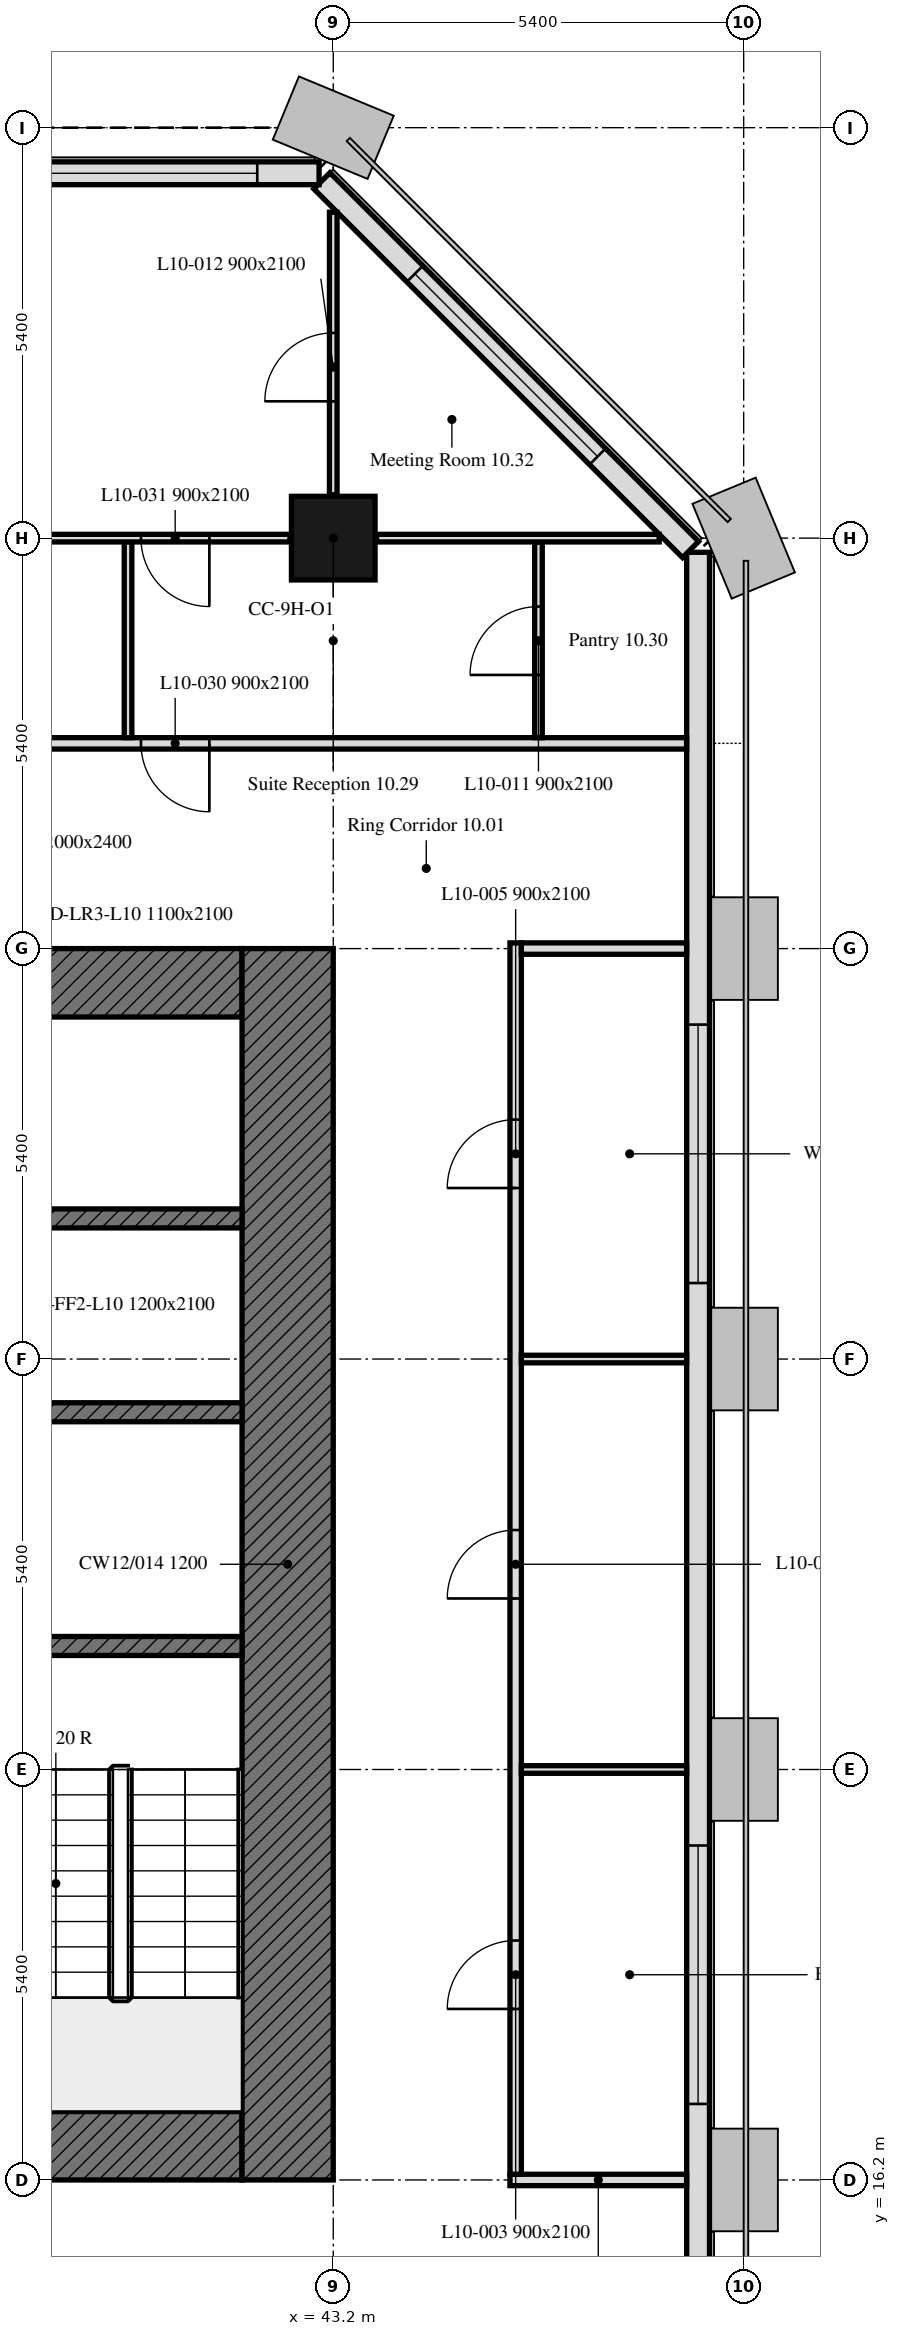
"""IFC4 building model, lengths in metres.
Left out: names, types, materials, properties, quantities, classifications, styles, units other than length and angle.
Written with IfcOpenShell. Run it as: python <this file> out.ifc"""

import sys

from ifc_helpers import new_model, si_unit, direction, frame, frame_2d, origin, origin_2d, place, context, subcontext, project, spatial, rectangle, extrude, element, fill, save


model = new_model("IFC4")
c1 = context("Model", 3, precision=1e-05, world=origin(), true_north=direction((0.0, 1.0)))
c2 = subcontext(c1, "Body", "Model", "MODEL_VIEW")
j1 = project(units=[si_unit("LENGTHUNIT", "METRE"), si_unit("PLANEANGLEUNIT", "RADIAN")], contexts=[c1])
p1 = place(None, origin())
s1 = spatial("IfcSite", under=j1, at=p1, CompositionType="ELEMENT")
p2 = place(p1, origin())
s2 = spatial("IfcBuilding", under=s1, at=p2, CompositionType="ELEMENT")
p3 = place(p2, frame((0.0, 0.0, 48.8)))
s3 = spatial("IfcBuildingStorey", under=s2, at=p3, CompositionType="ELEMENT", Elevation=48.8)
p4 = place(p3, frame((43.2, 37.8, 0.0), z_axis=(0.0, 0.0, 1.0), x_axis=(1.0, 0.0, 0.0)))
e1 = element("IfcColumn", 1, at=p4, inside=s3, PredefinedType="COLUMN", context=c2, shape_type="SweptSolid", body=[
    extrude(rectangle(XDim=1.1, YDim=1.1, at=origin_2d()), origin(), (0.0, 0.0, 1.0), 3.5),
])
p5 = place(p3, frame((48.0, 5.586, 0.0), z_axis=(0.0, 0.0, 1.0), x_axis=(0.0, 1.0, 0.0)))
e2 = element("IfcWall", 2, at=p5, inside=s3, PredefinedType="SOLIDWALL", context=c2, shape_type="SweptSolid", body=[
    extrude(rectangle(XDim=32.027, YDim=0.3, at=frame_2d((16.014, 0.0))), origin(), (0.0, 0.0, 1.0), 3.5),
])
p6 = place(p5, frame((0.814, 0.0, 0.9)))
e3 = element("IfcOpeningElement", 3, at=p6, cuts=e2, PredefinedType="OPENING", context=c2, shape_type="SweptSolid", body=[
    extrude(rectangle(XDim=3.4, YDim=1.7, at=frame_2d((1.7, 0.85))), frame((0.0, 0.16, 0.0), z_axis=(0.0, -1.0, 0.0), x_axis=(1.0, 0.0, 0.0)), (0.0, 0.0, 1.0), 0.32),
])
p7 = place(p5, frame((11.614, 0.0, 0.9)))
e4 = element("IfcOpeningElement", 4, at=p7, cuts=e2, PredefinedType="OPENING", context=c2, shape_type="SweptSolid", body=[
    extrude(rectangle(XDim=3.4, YDim=1.7, at=frame_2d((1.7, 0.85))), frame((0.0, 0.16, 0.0), z_axis=(0.0, -1.0, 0.0), x_axis=(1.0, 0.0, 0.0)), (0.0, 0.0, 1.0), 0.32),
])
p8 = place(p5, frame((22.414, 0.0, 0.9)))
e5 = element("IfcOpeningElement", 5, at=p8, cuts=e2, PredefinedType="OPENING", context=c2, shape_type="SweptSolid", body=[
    extrude(rectangle(XDim=3.4, YDim=1.7, at=frame_2d((1.7, 0.85))), frame((0.0, 0.16, 0.0), z_axis=(0.0, -1.0, 0.0), x_axis=(1.0, 0.0, 0.0)), (0.0, 0.0, 1.0), 0.32),
])
p9 = place(p3, frame((47.901, 37.65, 0.0), z_axis=(0.0, 0.0, 1.0), x_axis=(-0.707106781187, 0.707106781187, 0.0)))
e6 = element("IfcWall", 6, at=p9, inside=s3, PredefinedType="SOLIDWALL", context=c2, shape_type="SweptSolid", body=[
    extrude(rectangle(XDim=6.86, YDim=0.3, at=frame_2d((3.43, 0.0))), origin(), (0.0, 0.0, 1.0), 3.5),
])
p10 = place(p9, frame((1.73, 0.0, 0.9)))
e7 = element("IfcOpeningElement", 7, at=p10, cuts=e6, PredefinedType="OPENING", context=c2, shape_type="SweptSolid", body=[
    extrude(rectangle(XDim=3.4, YDim=1.7, at=frame_2d((1.7, 0.85))), frame((0.0, 0.16, 0.0), z_axis=(0.0, -1.0, 0.0), x_axis=(1.0, 0.0, 0.0)), (0.0, 0.0, 1.0), 0.32),
])
p11 = place(p3, frame((43.014, 42.6, 0.0), z_axis=(0.0, 0.0, 1.0), x_axis=(-1.0, 0.0, 0.0)))
e8 = element("IfcWall", 8, at=p11, inside=s3, PredefinedType="SOLIDWALL", context=c2, shape_type="SweptSolid", body=[
    extrude(rectangle(XDim=32.027, YDim=0.3, at=frame_2d((16.014, 0.0))), origin(), (0.0, 0.0, 1.0), 3.5),
])
p12 = place(p11, frame((0.814, 0.0, 0.9)))
e9 = element("IfcOpeningElement", 9, at=p12, cuts=e8, PredefinedType="OPENING", context=c2, shape_type="SweptSolid", body=[
    extrude(rectangle(XDim=3.4, YDim=1.7, at=frame_2d((1.7, 0.85))), frame((0.0, 0.16, 0.0), z_axis=(0.0, -1.0, 0.0), x_axis=(1.0, 0.0, 0.0)), (0.0, 0.0, 1.0), 0.32),
])
p13 = place(p11, frame((11.614, 0.0, 0.9)))
e10 = element("IfcOpeningElement", 10, at=p13, cuts=e8, PredefinedType="OPENING", context=c2, shape_type="SweptSolid", body=[
    extrude(rectangle(XDim=3.4, YDim=1.7, at=frame_2d((1.7, 0.85))), frame((0.0, 0.16, 0.0), z_axis=(0.0, -1.0, 0.0), x_axis=(1.0, 0.0, 0.0)), (0.0, 0.0, 1.0), 0.32),
])
p14 = place(p11, frame((22.414, 0.0, 0.9)))
e11 = element("IfcOpeningElement", 11, at=p14, cuts=e8, PredefinedType="OPENING", context=c2, shape_type="SweptSolid", body=[
    extrude(rectangle(XDim=3.4, YDim=1.7, at=frame_2d((1.7, 0.85))), frame((0.0, 0.16, 0.0), z_axis=(0.0, -1.0, 0.0), x_axis=(1.0, 0.0, 0.0)), (0.0, 0.0, 1.0), 0.32),
])
p15 = place(p3, frame((42.0, 16.65, 0.0), z_axis=(0.0, 0.0, 1.0), x_axis=(-1.0, 0.0, 0.0)))
e12 = element("IfcWall", 12, at=p15, inside=s3, PredefinedType="SOLIDWALL", context=c2, shape_type="SweptSolid", body=[
    extrude(rectangle(XDim=11.1, YDim=0.9, at=frame_2d((5.55, 0.0))), origin(), (0.0, 0.0, 1.0), 3.5),
])
p16 = place(p15, frame((3.55, 0.0, 0.0)))
e13 = element("IfcOpeningElement", 13, at=p16, cuts=e12, PredefinedType="OPENING", context=c2, shape_type="SweptSolid", body=[
    extrude(rectangle(XDim=2.0, YDim=2.4, at=frame_2d((1.0, 1.2))), frame((0.0, 0.45, 0.0), z_axis=(0.0, -1.0, 0.0), x_axis=(1.0, 0.0, 0.0)), (0.0, 0.0, 1.0), 0.9),
])
p17 = place(p3, frame((30.9, 31.95, 0.0), z_axis=(0.0, 0.0, 1.0), x_axis=(1.0, 0.0, 0.0)))
e14 = element("IfcWall", 14, at=p17, inside=s3, PredefinedType="SOLIDWALL", context=c2, shape_type="SweptSolid", body=[
    extrude(rectangle(XDim=11.1, YDim=0.9, at=frame_2d((5.55, 0.0))), origin(), (0.0, 0.0, 1.0), 3.5),
])
p18 = place(p17, frame((5.55, 0.0, 0.0)))
e15 = element("IfcOpeningElement", 15, at=p18, cuts=e14, PredefinedType="OPENING", context=c2, shape_type="SweptSolid", body=[
    extrude(rectangle(XDim=2.0, YDim=2.4, at=frame_2d((1.0, 1.2))), frame((0.0, 0.45, 0.0), z_axis=(0.0, -1.0, 0.0), x_axis=(1.0, 0.0, 0.0)), (0.0, 0.0, 1.0), 0.9),
])
p19 = place(p3, frame((42.6, 32.4, 0.0), z_axis=(0.0, 0.0, 1.0), x_axis=(0.0, -1.0, 0.0)))
e16 = element("IfcWall", 16, at=p19, inside=s3, PredefinedType="SOLIDWALL", context=c2, shape_type="SweptSolid", body=[
    extrude(rectangle(XDim=16.2, YDim=1.2, at=frame_2d((8.1, 0.0))), origin(), (0.0, 0.0, 1.0), 3.5),
])
for number, where, z_axis, x_axis in (
    (17, (38.8, 23.225, 0.0), (0.0, 0.0, 1.0), (1.0, 0.0, 0.0)),
    (18, (38.8, 26.3, 0.0), (0.0, 0.0, 1.0), (1.0, 0.0, 0.0)),
    (19, (38.8, 28.85, 0.0), (0.0, 0.0, 1.0), (1.0, 0.0, 0.0)),
):
    element("IfcWall", number, at=place(p3, frame(where, z_axis=z_axis, x_axis=x_axis)), inside=s3, PredefinedType="SOLIDWALL", context=c2, shape_type="SweptSolid", body=[
        extrude(rectangle(XDim=3.2, YDim=0.25, at=frame_2d((1.6, 0.0))), origin(), (0.0, 0.0, 1.0), 3.5),
    ])
p20 = place(p3, frame((47.849, 16.2, 0.0), z_axis=(0.0, 0.0, 1.0), x_axis=(-1.0, 0.0, 0.0)))
e20 = element("IfcWall", 20, at=p20, inside=s3, PredefinedType="PARTITIONING", context=c2, shape_type="SweptSolid", body=[
    extrude(rectangle(XDim=2.324, YDim=0.15, at=frame_2d((1.162, 0.0))), origin(), (0.0, 0.0, 1.0), 2.75),
])
p21 = place(p3, frame((45.6, 16.275, 0.0), z_axis=(0.0, 0.0, 1.0), x_axis=(0.0, 1.0, 0.0)))
e21 = element("IfcWall", 21, at=p21, inside=s3, PredefinedType="PARTITIONING", context=c2, shape_type="SweptSolid", body=[
    extrude(rectangle(XDim=16.2, YDim=0.15, at=frame_2d((8.1, 0.0))), origin(), (0.0, 0.0, 1.0), 2.75),
])
p22 = place(p21, frame((2.175, 0.0, 0.0)))
e22 = element("IfcOpeningElement", 22, at=p22, cuts=e21, PredefinedType="OPENING", context=c2, shape_type="SweptSolid", body=[
    extrude(rectangle(XDim=0.9, YDim=2.1, at=frame_2d((0.45, 1.05))), frame((0.0, 0.075, 0.0), z_axis=(0.0, -1.0, 0.0), x_axis=(1.0, 0.0, 0.0)), (0.0, 0.0, 1.0), 0.15),
])
p23 = place(p21, frame((7.575, 0.0, 0.0)))
e23 = element("IfcOpeningElement", 23, at=p23, cuts=e21, PredefinedType="OPENING", context=c2, shape_type="SweptSolid", body=[
    extrude(rectangle(XDim=0.9, YDim=2.1, at=frame_2d((0.45, 1.05))), frame((0.0, 0.075, 0.0), z_axis=(0.0, -1.0, 0.0), x_axis=(1.0, 0.0, 0.0)), (0.0, 0.0, 1.0), 0.15),
])
p24 = place(p21, frame((12.975, 0.0, 0.0)))
e24 = element("IfcOpeningElement", 24, at=p24, cuts=e21, PredefinedType="OPENING", context=c2, shape_type="SweptSolid", body=[
    extrude(rectangle(XDim=0.9, YDim=2.1, at=frame_2d((0.45, 1.05))), frame((0.0, 0.075, 0.0), z_axis=(0.0, -1.0, 0.0), x_axis=(1.0, 0.0, 0.0)), (0.0, 0.0, 1.0), 0.15),
])
p25 = place(p3, frame((45.675, 32.4, 0.0), z_axis=(0.0, 0.0, 1.0), x_axis=(1.0, 0.0, 0.0)))
e25 = element("IfcWall", 25, at=p25, inside=s3, PredefinedType="PARTITIONING", context=c2, shape_type="SweptSolid", body=[
    extrude(rectangle(XDim=2.174, YDim=0.15, at=frame_2d((1.087, 0.0))), origin(), (0.0, 0.0, 1.0), 2.75),
])
p26 = place(p3, frame((47.849, 35.1, 0.0), z_axis=(0.0, 0.0, 1.0), x_axis=(-1.0, 0.0, 0.0)))
e26 = element("IfcWall", 26, at=p26, inside=s3, PredefinedType="PARTITIONING", context=c2, shape_type="SweptSolid", body=[
    extrude(rectangle(XDim=41.698, YDim=0.15, at=frame_2d((20.849, 0.0))), origin(), (0.0, 0.0, 1.0), 3.5),
])
p27 = place(p26, frame((39.919, 0.0, 0.0)))
e27 = element("IfcOpeningElement", 27, at=p27, cuts=e26, PredefinedType="OPENING", context=c2, shape_type="SweptSolid", body=[
    extrude(rectangle(XDim=0.9, YDim=2.1, at=frame_2d((0.45, 1.05))), frame((0.0, 0.075, 0.0), z_axis=(0.0, -1.0, 0.0), x_axis=(1.0, 0.0, 0.0)), (0.0, 0.0, 1.0), 0.15),
])
p28 = place(p26, frame((12.919, 0.0, 0.0)))
e28 = element("IfcOpeningElement", 28, at=p28, cuts=e26, PredefinedType="OPENING", context=c2, shape_type="SweptSolid", body=[
    extrude(rectangle(XDim=0.9, YDim=2.1, at=frame_2d((0.45, 1.05))), frame((0.0, 0.075, 0.0), z_axis=(0.0, -1.0, 0.0), x_axis=(1.0, 0.0, 0.0)), (0.0, 0.0, 1.0), 0.15),
])
p29 = place(p26, frame((28.499, 0.0, 0.0)))
e29 = element("IfcOpeningElement", 29, at=p29, cuts=e26, PredefinedType="OPENING", context=c2, shape_type="SweptSolid", body=[
    extrude(rectangle(XDim=0.9, YDim=2.1, at=frame_2d((0.45, 1.05))), frame((0.0, 0.075, 0.0), z_axis=(0.0, -1.0, 0.0), x_axis=(1.0, 0.0, 0.0)), (0.0, 0.0, 1.0), 0.15),
])
p30 = place(p26, frame((34.519, 0.0, 0.0)))
e30 = element("IfcOpeningElement", 30, at=p30, cuts=e26, PredefinedType="OPENING", context=c2, shape_type="SweptSolid", body=[
    extrude(rectangle(XDim=0.9, YDim=2.1, at=frame_2d((0.45, 1.05))), frame((0.0, 0.075, 0.0), z_axis=(0.0, -1.0, 0.0), x_axis=(1.0, 0.0, 0.0)), (0.0, 0.0, 1.0), 0.15),
])
p31 = place(p26, frame((6.279, 0.0, 0.0)))
e31 = element("IfcOpeningElement", 31, at=p31, cuts=e26, PredefinedType="OPENING", context=c2, shape_type="SweptSolid", body=[
    extrude(rectangle(XDim=0.9, YDim=2.1, at=frame_2d((0.45, 1.05))), frame((0.0, 0.075, 0.0), z_axis=(0.0, -1.0, 0.0), x_axis=(1.0, 0.0, 0.0)), (0.0, 0.0, 1.0), 0.15),
])
p32 = place(p3, frame((40.5, 35.175, 0.0), z_axis=(0.0, 0.0, 1.0), x_axis=(0.0, 1.0, 0.0)))
e32 = element("IfcWall", 32, at=p32, inside=s3, PredefinedType="PARTITIONING", context=c2, shape_type="SweptSolid", body=[
    extrude(rectangle(XDim=2.575, YDim=0.1, at=frame_2d((1.288, 0.0))), origin(), (0.0, 0.0, 1.0), 3.5),
])
p33 = place(p3, frame((45.9, 35.175, 0.0), z_axis=(0.0, 0.0, 1.0), x_axis=(0.0, 1.0, 0.0)))
e33 = element("IfcWall", 33, at=p33, inside=s3, PredefinedType="PARTITIONING", context=c2, shape_type="SweptSolid", body=[
    extrude(rectangle(XDim=2.575, YDim=0.1, at=frame_2d((1.288, 0.0))), origin(), (0.0, 0.0, 1.0), 3.5),
])
p34 = place(p33, frame((0.825, 0.0, 0.0)))
e34 = element("IfcOpeningElement", 34, at=p34, cuts=e33, PredefinedType="OPENING", context=c2, shape_type="SweptSolid", body=[
    extrude(rectangle(XDim=0.9, YDim=2.1, at=frame_2d((0.45, 1.05))), frame((0.0, 0.05, 0.0), z_axis=(0.0, -1.0, 0.0), x_axis=(1.0, 0.0, 0.0)), (0.0, 0.0, 1.0), 0.1),
])
p35 = place(p3, frame((42.63, 37.8, 0.0), z_axis=(0.0, 0.0, 1.0), x_axis=(-1.0, 0.0, 0.0)))
e35 = element("IfcWall", 35, at=p35, inside=s3, PredefinedType="PARTITIONING", context=c2, shape_type="SweptSolid", body=[
    extrude(rectangle(XDim=4.26, YDim=0.1, at=frame_2d((2.13, 0.0))), origin(), (0.0, 0.0, 1.0), 3.5),
])
p36 = place(p35, frame((1.06, 0.0, 0.0)))
e36 = element("IfcOpeningElement", 36, at=p36, cuts=e35, PredefinedType="OPENING", context=c2, shape_type="SweptSolid", body=[
    extrude(rectangle(XDim=0.9, YDim=2.1, at=frame_2d((0.45, 1.05))), frame((0.0, 0.05, 0.0), z_axis=(0.0, -1.0, 0.0), x_axis=(1.0, 0.0, 0.0)), (0.0, 0.0, 1.0), 0.1),
])
p37 = place(p3, frame((47.488, 37.8, 0.0), z_axis=(0.0, 0.0, 1.0), x_axis=(-1.0, 0.0, 0.0)))
e37 = element("IfcWall", 37, at=p37, inside=s3, PredefinedType="PARTITIONING", context=c2, shape_type="SweptSolid", body=[
    extrude(rectangle(XDim=3.718, YDim=0.1, at=frame_2d((1.859, 0.0))), origin(), (0.0, 0.0, 1.0), 3.5),
])
p38 = place(p3, frame((43.2, 38.37, 0.0), z_axis=(0.0, 0.0, 1.0), x_axis=(0.0, 1.0, 0.0)))
e38 = element("IfcWall", 38, at=p38, inside=s3, PredefinedType="PARTITIONING", context=c2, shape_type="SweptSolid", body=[
    extrude(rectangle(XDim=3.718, YDim=0.1, at=frame_2d((1.859, 0.0))), origin(), (0.0, 0.0, 1.0), 3.5),
])
p39 = place(p38, frame((1.23, 0.0, 0.0)))
e39 = element("IfcOpeningElement", 39, at=p39, cuts=e38, PredefinedType="OPENING", context=c2, shape_type="SweptSolid", body=[
    extrude(rectangle(XDim=0.9, YDim=2.1, at=frame_2d((0.45, 1.05))), frame((0.0, 0.05, 0.0), z_axis=(0.0, -1.0, 0.0), x_axis=(1.0, 0.0, 0.0)), (0.0, 0.0, 1.0), 0.1),
])
for number, where, z_axis, x_axis in (
    (40, (47.849, 21.6, 0.0), (0.0, 0.0, 1.0), (-1.0, 0.0, 0.0)),
    (41, (47.849, 27.0, 0.0), (0.0, 0.0, 1.0), (-1.0, 0.0, 0.0)),
):
    element("IfcWall", number, at=place(p3, frame(where, z_axis=z_axis, x_axis=x_axis)), inside=s3, PredefinedType="PARTITIONING", context=c2, shape_type="SweptSolid", body=[
        extrude(rectangle(XDim=2.174, YDim=0.1, at=frame_2d((1.087, 0.0))), origin(), (0.0, 0.0, 1.0), 2.75),
    ])
p40 = place(p7, origin())
e42 = element("IfcWindow", 42, at=p40, inside=s3, PartitioningType="SINGLE_PANEL", PredefinedType="WINDOW", context=c2, shape_type="SweptSolid", body=[
    extrude(rectangle(XDim=3.4, YDim=1.7, at=frame_2d((1.7, 0.85))), frame((0.0, 0.03, 0.0), z_axis=(0.0, -1.0, 0.0), x_axis=(1.0, 0.0, 0.0)), (0.0, 0.0, 1.0), 0.06),
])
fill(e4, e42)
p41 = place(p8, origin())
e43 = element("IfcWindow", 43, at=p41, inside=s3, PartitioningType="SINGLE_PANEL", PredefinedType="WINDOW", context=c2, shape_type="SweptSolid", body=[
    extrude(rectangle(XDim=3.4, YDim=1.7, at=frame_2d((1.7, 0.85))), frame((0.0, 0.03, 0.0), z_axis=(0.0, -1.0, 0.0), x_axis=(1.0, 0.0, 0.0)), (0.0, 0.0, 1.0), 0.06),
])
fill(e5, e43)
p42 = place(p10, origin())
e44 = element("IfcWindow", 44, at=p42, inside=s3, PartitioningType="SINGLE_PANEL", PredefinedType="WINDOW", context=c2, shape_type="SweptSolid", body=[
    extrude(rectangle(XDim=3.4, YDim=1.7, at=frame_2d((1.7, 0.85))), frame((0.0, 0.03, 0.0), z_axis=(0.0, -1.0, 0.0), x_axis=(1.0, 0.0, 0.0)), (0.0, 0.0, 1.0), 0.06),
])
fill(e7, e44)
p43 = place(p12, origin())
e45 = element("IfcWindow", 45, at=p43, inside=s3, PartitioningType="SINGLE_PANEL", PredefinedType="WINDOW", context=c2, shape_type="SweptSolid", body=[
    extrude(rectangle(XDim=3.4, YDim=1.7, at=frame_2d((1.7, 0.85))), frame((0.0, 0.03, 0.0), z_axis=(0.0, -1.0, 0.0), x_axis=(1.0, 0.0, 0.0)), (0.0, 0.0, 1.0), 0.06),
])
fill(e9, e45)
p44 = place(p22, origin())
e46 = element("IfcDoor", 46, at=p44, inside=s3, OperationType="SINGLE_SWING_LEFT", PredefinedType="DOOR", context=c2, shape_type="SweptSolid", body=[
    extrude(rectangle(XDim=0.9, YDim=2.1, at=frame_2d((0.45, 1.05))), frame((0.0, 0.025, 0.0), z_axis=(0.0, -1.0, 0.0), x_axis=(1.0, 0.0, 0.0)), (0.0, 0.0, 1.0), 0.05),
])
fill(e22, e46)
p45 = place(p23, origin())
e47 = element("IfcDoor", 47, at=p45, inside=s3, OperationType="SINGLE_SWING_LEFT", PredefinedType="DOOR", context=c2, shape_type="SweptSolid", body=[
    extrude(rectangle(XDim=0.9, YDim=2.1, at=frame_2d((0.45, 1.05))), frame((0.0, 0.025, 0.0), z_axis=(0.0, -1.0, 0.0), x_axis=(1.0, 0.0, 0.0)), (0.0, 0.0, 1.0), 0.05),
])
fill(e23, e47)
p46 = place(p24, origin())
e48 = element("IfcDoor", 48, at=p46, inside=s3, OperationType="SINGLE_SWING_LEFT", PredefinedType="DOOR", context=c2, shape_type="SweptSolid", body=[
    extrude(rectangle(XDim=0.9, YDim=2.1, at=frame_2d((0.45, 1.05))), frame((0.0, 0.025, 0.0), z_axis=(0.0, -1.0, 0.0), x_axis=(1.0, 0.0, 0.0)), (0.0, 0.0, 1.0), 0.05),
])
fill(e24, e48)
p47 = place(p34, origin())
e49 = element("IfcDoor", 49, at=p47, inside=s3, OperationType="SINGLE_SWING_RIGHT", PredefinedType="DOOR", context=c2, shape_type="SweptSolid", body=[
    extrude(rectangle(XDim=0.9, YDim=2.1, at=frame_2d((0.45, 1.05))), frame((0.0, 0.025, 0.0), z_axis=(0.0, -1.0, 0.0), x_axis=(1.0, 0.0, 0.0)), (0.0, 0.0, 1.0), 0.05),
])
fill(e34, e49)
p48 = place(p39, origin())
e50 = element("IfcDoor", 50, at=p48, inside=s3, OperationType="SINGLE_SWING_RIGHT", PredefinedType="DOOR", context=c2, shape_type="SweptSolid", body=[
    extrude(rectangle(XDim=0.9, YDim=2.1, at=frame_2d((0.45, 1.05))), frame((0.0, 0.025, 0.0), z_axis=(0.0, -1.0, 0.0), x_axis=(1.0, 0.0, 0.0)), (0.0, 0.0, 1.0), 0.05),
])
fill(e39, e50)
p49 = place(p31, origin())
e51 = element("IfcDoor", 51, at=p49, inside=s3, OperationType="SINGLE_SWING_LEFT", PredefinedType="DOOR", context=c2, shape_type="SweptSolid", body=[
    extrude(rectangle(XDim=0.9, YDim=2.1, at=frame_2d((0.45, 1.05))), frame((0.0, 0.025, 0.0), z_axis=(0.0, -1.0, 0.0), x_axis=(1.0, 0.0, 0.0)), (0.0, 0.0, 1.0), 0.05),
])
fill(e31, e51)
p50 = place(p36, origin())
e52 = element("IfcDoor", 52, at=p50, inside=s3, OperationType="SINGLE_SWING_LEFT", PredefinedType="DOOR", context=c2, shape_type="SweptSolid", body=[
    extrude(rectangle(XDim=0.9, YDim=2.1, at=frame_2d((0.45, 1.05))), frame((0.0, 0.025, 0.0), z_axis=(0.0, -1.0, 0.0), x_axis=(1.0, 0.0, 0.0)), (0.0, 0.0, 1.0), 0.05),
])
fill(e36, e52)
save(model, sys.argv[1])
